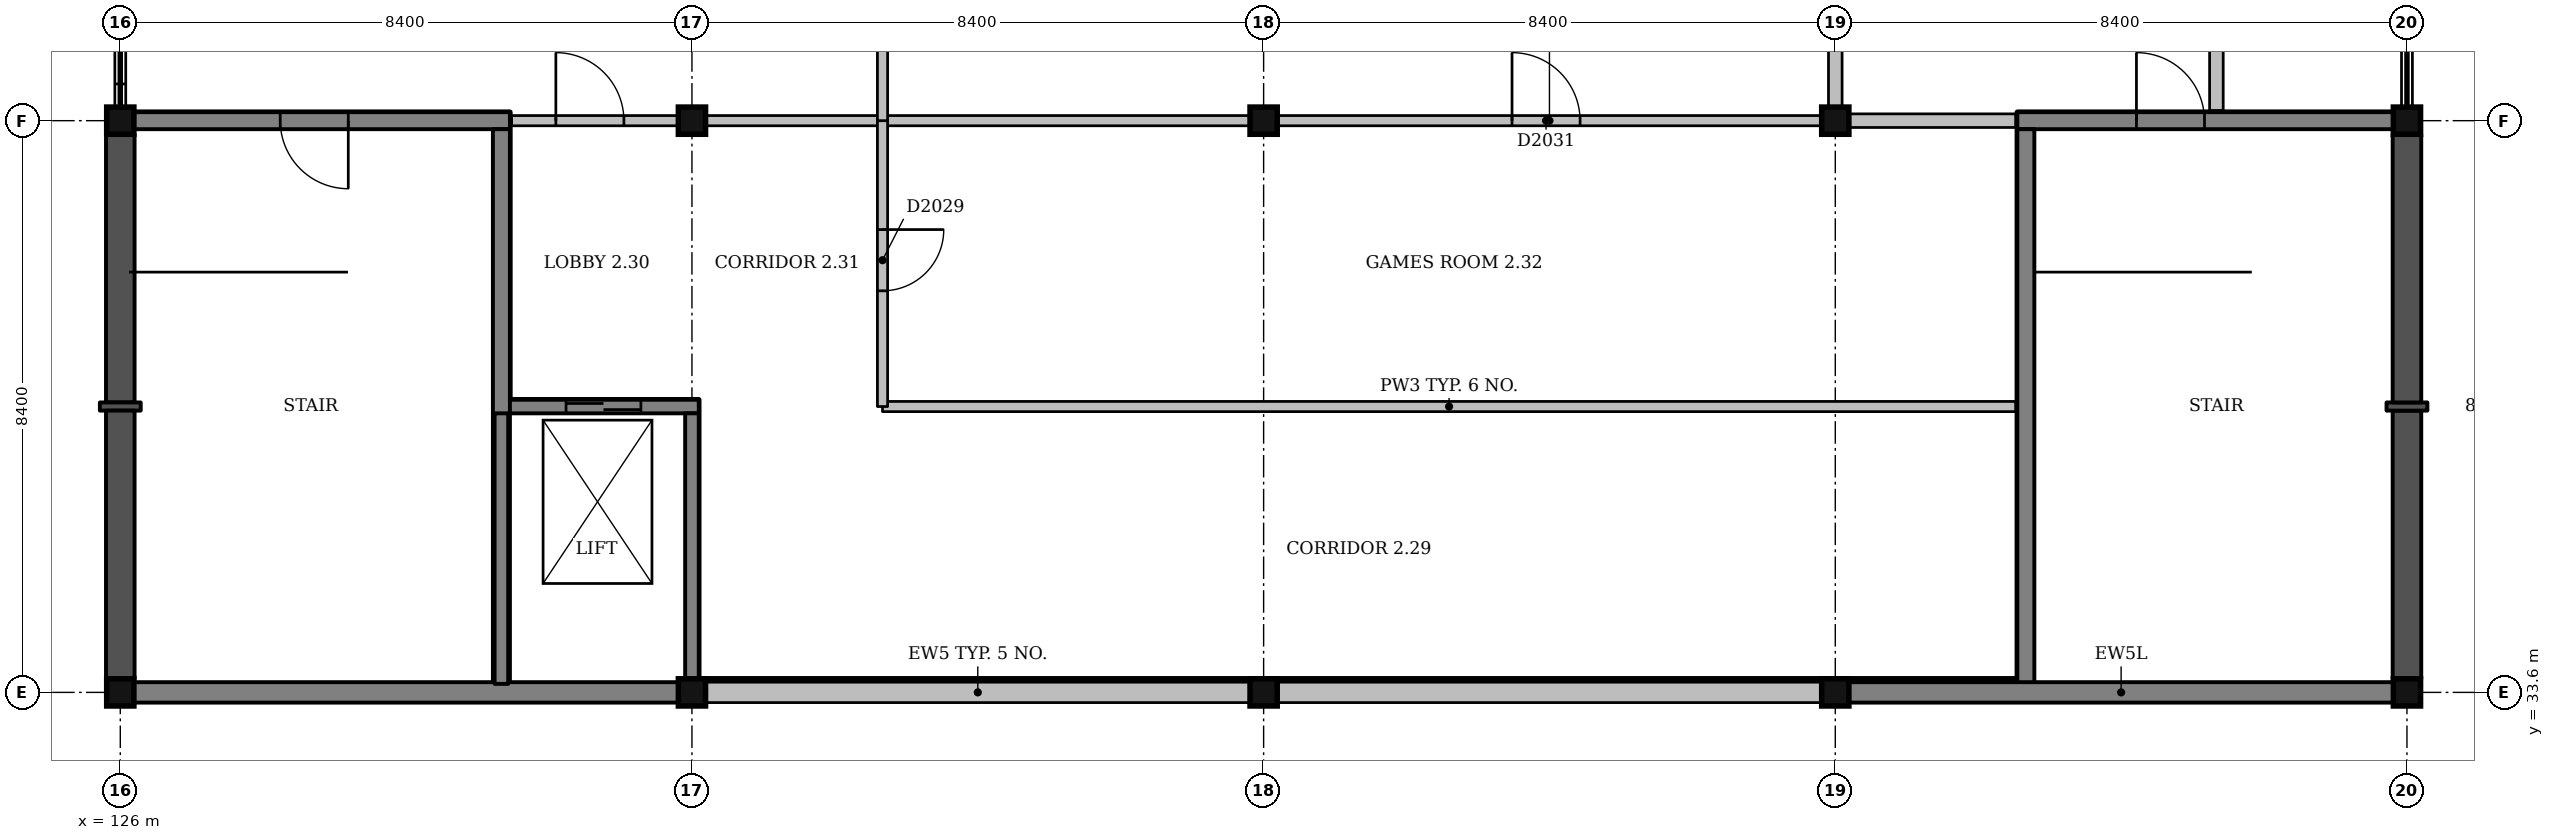
"""IFC4 building model, lengths in metres.
Left out: names, types, materials, properties, quantities, classifications, styles, units other than length and angle.
Written with IfcOpenShell. Run it as: python <this file> out.ifc"""

import sys

from ifc_helpers import new_model, si_unit, direction, frame, frame_2d, origin, origin_2d, place, context, subcontext, project, spatial, rectangle, extrude, element, fill, save


model = new_model("IFC4")
c1 = context("Model", 3, precision=1e-05, world=origin(), true_north=direction((0.0, 1.0)))
c2 = subcontext(c1, "Body", "Model", "MODEL_VIEW")
j1 = project(units=[si_unit("LENGTHUNIT", "METRE"), si_unit("PLANEANGLEUNIT", "RADIAN")], contexts=[c1])
p1 = place(None, origin())
s1 = spatial("IfcSite", under=j1, at=p1, CompositionType="ELEMENT")
p2 = place(p1, origin())
s2 = spatial("IfcBuilding", under=s1, at=p2, CompositionType="ELEMENT")
p3 = place(p2, frame((0.0, 0.0, 9.0)))
s3 = spatial("IfcBuildingStorey", under=s2, at=p3, CompositionType="ELEMENT", Elevation=9.0)
for number, where, z_axis, x_axis in (
    (1, (126.0, 33.6, 0.0), (0.0, 0.0, 1.0), (1.0, 0.0, 0.0)),
    (2, (126.0, 42.0, 0.0), (0.0, 0.0, 1.0), (1.0, 0.0, 0.0)),
    (3, (134.4, 33.6, 0.0), (0.0, 0.0, 1.0), (1.0, 0.0, 0.0)),
    (4, (134.4, 42.0, 0.0), (0.0, 0.0, 1.0), (1.0, 0.0, 0.0)),
    (5, (142.8, 33.6, 0.0), (0.0, 0.0, 1.0), (1.0, 0.0, 0.0)),
    (6, (142.8, 42.0, 0.0), (0.0, 0.0, 1.0), (1.0, 0.0, 0.0)),
    (7, (151.2, 33.6, 0.0), (0.0, 0.0, 1.0), (1.0, 0.0, 0.0)),
    (8, (151.2, 42.0, 0.0), (0.0, 0.0, 1.0), (1.0, 0.0, 0.0)),
    (9, (159.6, 33.6, 0.0), (0.0, 0.0, 1.0), (1.0, 0.0, 0.0)),
    (10, (159.6, 42.0, 0.0), (0.0, 0.0, 1.0), (1.0, 0.0, 0.0)),
):
    element("IfcColumn", number, at=place(p3, frame(where, z_axis=z_axis, x_axis=x_axis)), inside=s3, PredefinedType="COLUMN", context=c2, shape_type="SweptSolid", body=[
        extrude(rectangle(XDim=0.4, YDim=0.4, at=origin_2d()), origin(), (0.0, 0.0, 1.0), 4.5),
    ])
p4 = place(p3, frame((131.5, 37.8, 0.0), z_axis=(0.0, 0.0, 1.0), x_axis=(1.0, 0.0, 0.0)))
e11 = element("IfcWall", 11, at=p4, inside=s3, PredefinedType="SHEAR", context=c2, shape_type="SweptSolid", body=[
    extrude(rectangle(XDim=3.0, YDim=0.2, at=frame_2d((1.5, 0.0))), origin(), (0.0, 0.0, 1.0), 4.5),
])
p5 = place(p4, frame((1.05, 0.0, 0.0)))
e12 = element("IfcOpeningElement", 12, at=p5, cuts=e11, PredefinedType="OPENING", context=c2, shape_type="SweptSolid", body=[
    extrude(rectangle(XDim=1.1, YDim=2.1, at=frame_2d((0.55, 1.05))), frame((0.0, 0.11, 0.0), z_axis=(0.0, -1.0, 0.0), x_axis=(1.0, 0.0, 0.0)), (0.0, 0.0, 1.0), 0.22),
])
p6 = place(p3, frame((134.4, 33.8, 0.0), z_axis=(0.0, 0.0, 1.0), x_axis=(0.0, 1.0, 0.0)))
e13 = element("IfcWall", 13, at=p6, inside=s3, PredefinedType="SHEAR", context=c2, shape_type="SweptSolid", body=[
    extrude(rectangle(XDim=3.9, YDim=0.2, at=frame_2d((1.95, 0.0))), origin(), (0.0, 0.0, 1.0), 4.5),
])
p7 = place(p3, frame((126.2, 42.0, 0.0), z_axis=(0.0, 0.0, 1.0), x_axis=(1.0, 0.0, 0.0)))
e14 = element("IfcWall", 14, at=p7, inside=s3, PredefinedType="SHEAR", context=c2, shape_type="SweptSolid", body=[
    extrude(rectangle(XDim=5.525, YDim=0.25, at=frame_2d((2.763, 0.0))), origin(), (0.0, 0.0, 1.0), 4.2),
])
p8 = place(p7, frame((2.15, 0.0, 0.0)))
e15 = element("IfcOpeningElement", 15, at=p8, cuts=e14, PredefinedType="OPENING", context=c2, shape_type="SweptSolid", body=[
    extrude(rectangle(XDim=1.0, YDim=2.1, at=frame_2d((0.5, 1.05))), frame((0.0, 0.135, 0.0), z_axis=(0.0, -1.0, 0.0), x_axis=(1.0, 0.0, 0.0)), (0.0, 0.0, 1.0), 0.27),
])
p9 = place(p3, frame((131.6, 33.725, 0.0), z_axis=(0.0, 0.0, 1.0), x_axis=(0.0, 1.0, 0.0)))
e16 = element("IfcWall", 16, at=p9, inside=s3, PredefinedType="SHEAR", context=c2, shape_type="SweptSolid", body=[
    extrude(rectangle(XDim=8.15, YDim=0.25, at=frame_2d((4.075, 0.0))), origin(), (0.0, 0.0, 1.0), 4.2),
])
p10 = place(p3, frame((153.875, 42.0, 0.0), z_axis=(0.0, 0.0, 1.0), x_axis=(1.0, 0.0, 0.0)))
e17 = element("IfcWall", 17, at=p10, inside=s3, PredefinedType="SHEAR", context=c2, shape_type="SweptSolid", body=[
    extrude(rectangle(XDim=5.525, YDim=0.25, at=frame_2d((2.762, 0.0))), origin(), (0.0, 0.0, 1.0), 4.2),
])
p11 = place(p10, frame((1.75, 0.0, 0.0)))
e18 = element("IfcOpeningElement", 18, at=p11, cuts=e17, PredefinedType="OPENING", context=c2, shape_type="SweptSolid", body=[
    extrude(rectangle(XDim=1.0, YDim=2.1, at=frame_2d((0.5, 1.05))), frame((0.0, 0.135, 0.0), z_axis=(0.0, -1.0, 0.0), x_axis=(1.0, 0.0, 0.0)), (0.0, 0.0, 1.0), 0.27),
])
p12 = place(p3, frame((154.0, 33.725, 0.0), z_axis=(0.0, 0.0, 1.0), x_axis=(0.0, 1.0, 0.0)))
e19 = element("IfcWall", 19, at=p12, inside=s3, PredefinedType="SHEAR", context=c2, shape_type="SweptSolid", body=[
    extrude(rectangle(XDim=8.15, YDim=0.25, at=frame_2d((4.075, 0.0))), origin(), (0.0, 0.0, 1.0), 4.2),
])
p13 = place(p3, frame((159.6, 33.8, 0.0), z_axis=(0.0, 0.0, 1.0), x_axis=(0.0, 1.0, 0.0)))
e20 = element("IfcWall", 20, at=p13, inside=s3, PredefinedType="SOLIDWALL", context=c2, shape_type="SweptSolid", body=[
    extrude(rectangle(XDim=3.94, YDim=0.42, at=frame_2d((1.97, 0.0))), origin(), (0.0, 0.0, 1.0), 4.2),
])
p14 = place(p3, frame((159.6, 37.74, 0.0), z_axis=(0.0, 0.0, 1.0), x_axis=(0.0, 1.0, 0.0)))
e21 = element("IfcWall", 21, at=p14, inside=s3, PredefinedType="SOLIDWALL", context=c2, shape_type="SweptSolid", body=[
    extrude(rectangle(XDim=0.12, YDim=0.6, at=frame_2d((0.06, 0.0))), origin(), (0.0, 0.0, 1.0), 4.2),
])
for number, where, z_axis, x_axis in (
    (22, (159.6, 37.86, 0.0), (0.0, 0.0, 1.0), (0.0, 1.0, 0.0)),
    (23, (126.0, 41.8, 0.0), (0.0, 0.0, 1.0), (0.0, -1.0, 0.0)),
):
    element("IfcWall", number, at=place(p3, frame(where, z_axis=z_axis, x_axis=x_axis)), inside=s3, PredefinedType="SOLIDWALL", context=c2, shape_type="SweptSolid", body=[
        extrude(rectangle(XDim=3.94, YDim=0.42, at=frame_2d((1.97, 0.0))), origin(), (0.0, 0.0, 1.0), 4.2),
    ])
p15 = place(p3, frame((126.0, 37.86, 0.0), z_axis=(0.0, 0.0, 1.0), x_axis=(0.0, -1.0, 0.0)))
e24 = element("IfcWall", 24, at=p15, inside=s3, PredefinedType="SOLIDWALL", context=c2, shape_type="SweptSolid", body=[
    extrude(rectangle(XDim=0.12, YDim=0.6, at=frame_2d((0.06, 0.0))), origin(), (0.0, 0.0, 1.0), 4.2),
])
p16 = place(p3, frame((126.0, 37.74, 0.0), z_axis=(0.0, 0.0, 1.0), x_axis=(0.0, -1.0, 0.0)))
e25 = element("IfcWall", 25, at=p16, inside=s3, PredefinedType="SOLIDWALL", context=c2, shape_type="SweptSolid", body=[
    extrude(rectangle(XDim=3.94, YDim=0.42, at=frame_2d((1.97, 0.0))), origin(), (0.0, 0.0, 1.0), 4.2),
])
p17 = place(p3, frame((126.2, 33.6, 0.0), z_axis=(0.0, 0.0, 1.0), x_axis=(1.0, 0.0, 0.0)))
e26 = element("IfcWall", 26, at=p17, inside=s3, PredefinedType="SOLIDWALL", context=c2, shape_type="SweptSolid", body=[
    extrude(rectangle(XDim=8.0, YDim=0.3, at=frame_2d((4.0, 0.0))), origin(), (0.0, 0.0, 1.0), 4.2),
])
for number, where, z_axis, x_axis in (
    (27, (134.6, 33.6, 0.0), (0.0, 0.0, 1.0), (1.0, 0.0, 0.0)),
    (28, (143.0, 33.6, 0.0), (0.0, 0.0, 1.0), (1.0, 0.0, 0.0)),
    (29, (151.4, 33.6, 0.0), (0.0, 0.0, 1.0), (1.0, 0.0, 0.0)),
):
    element("IfcWall", number, at=place(p3, frame(where, z_axis=z_axis, x_axis=x_axis)), inside=s3, PredefinedType="SOLIDWALL", context=c2, shape_type="SweptSolid", body=[
        extrude(rectangle(XDim=8.0, YDim=0.3, at=frame_2d((4.0, 0.0))), origin(), (0.0, 0.0, 1.0), 3.9),
    ])
p18 = place(p3, frame((137.2, 37.8, 0.0), z_axis=(0.0, 0.0, 1.0), x_axis=(1.0, 0.0, 0.0)))
e30 = element("IfcWall", 30, at=p18, inside=s3, PredefinedType="PARTITIONING", context=c2, shape_type="SweptSolid", body=[
    extrude(rectangle(XDim=16.65, YDim=0.15, at=frame_2d((8.325, 0.0))), origin(), (0.0, 0.0, 1.0), 3.6),
])
p19 = place(p3, frame((134.6, 42.0, 0.0), z_axis=(0.0, 0.0, 1.0), x_axis=(1.0, 0.0, 0.0)))
e31 = element("IfcWall", 31, at=p19, inside=s3, PredefinedType="PARTITIONING", context=c2, shape_type="SweptSolid", body=[
    extrude(rectangle(XDim=2.6, YDim=0.15, at=frame_2d((1.3, 0.0))), origin(), (0.0, 0.0, 1.0), 3.6),
])
p20 = place(p3, frame((131.75, 42.0, 0.0), z_axis=(0.0, 0.0, 1.0), x_axis=(1.0, 0.0, 0.0)))
e32 = element("IfcWall", 32, at=p20, inside=s3, PredefinedType="PARTITIONING", context=c2, shape_type="SweptSolid", body=[
    extrude(rectangle(XDim=2.45, YDim=0.15, at=frame_2d((1.225, 0.0))), origin(), (0.0, 0.0, 1.0), 3.6),
])
p21 = place(p20, frame((0.65, 0.0, 0.0)))
e33 = element("IfcOpeningElement", 33, at=p21, cuts=e32, PredefinedType="OPENING", context=c2, shape_type="SweptSolid", body=[
    extrude(rectangle(XDim=1.0, YDim=2.1, at=frame_2d((0.5, 1.05))), frame((0.0, 0.085, 0.0), z_axis=(0.0, -1.0, 0.0), x_axis=(1.0, 0.0, 0.0)), (0.0, 0.0, 1.0), 0.17),
])
p22 = place(p3, frame((151.4, 42.0, 0.0), z_axis=(0.0, 0.0, 1.0), x_axis=(1.0, 0.0, 0.0)))
e34 = element("IfcWall", 34, at=p22, inside=s3, PredefinedType="PARTITIONING", context=c2, shape_type="SweptSolid", body=[
    extrude(rectangle(XDim=2.45, YDim=0.2, at=frame_2d((1.225, 0.0))), origin(), (0.0, 0.0, 1.0), 3.6),
])
p23 = place(p3, frame((137.2, 42.0, 0.0), z_axis=(0.0, 0.0, 1.0), x_axis=(1.0, 0.0, 0.0)))
e35 = element("IfcWall", 35, at=p23, inside=s3, PredefinedType="PARTITIONING", context=c2, shape_type="SweptSolid", body=[
    extrude(rectangle(XDim=5.4, YDim=0.15, at=frame_2d((2.7, 0.0))), origin(), (0.0, 0.0, 1.0), 3.6),
])
p24 = place(p3, frame((143.0, 42.0, 0.0), z_axis=(0.0, 0.0, 1.0), x_axis=(1.0, 0.0, 0.0)))
e36 = element("IfcWall", 36, at=p24, inside=s3, PredefinedType="PARTITIONING", context=c2, shape_type="SweptSolid", body=[
    extrude(rectangle(XDim=8.0, YDim=0.15, at=frame_2d((4.0, 0.0))), origin(), (0.0, 0.0, 1.0), 3.6),
])
p25 = place(p24, frame((3.45, 0.0, 0.0)))
e37 = element("IfcOpeningElement", 37, at=p25, cuts=e36, PredefinedType="OPENING", context=c2, shape_type="SweptSolid", body=[
    extrude(rectangle(XDim=1.0, YDim=2.1, at=frame_2d((0.5, 1.05))), frame((0.0, 0.085, 0.0), z_axis=(0.0, -1.0, 0.0), x_axis=(1.0, 0.0, 0.0)), (0.0, 0.0, 1.0), 0.17),
])
p26 = place(p3, frame((137.2, 37.8, 0.0), z_axis=(0.0, 0.0, 1.0), x_axis=(0.0, 1.0, 0.0)))
e38 = element("IfcWall", 38, at=p26, inside=s3, PredefinedType="PARTITIONING", context=c2, shape_type="SweptSolid", body=[
    extrude(rectangle(XDim=4.2, YDim=0.15, at=frame_2d((2.1, 0.0))), origin(), (0.0, 0.0, 1.0), 3.6),
])
p27 = place(p26, frame((1.7, 0.0, 0.0)))
e39 = element("IfcOpeningElement", 39, at=p27, cuts=e38, PredefinedType="OPENING", context=c2, shape_type="SweptSolid", body=[
    extrude(rectangle(XDim=0.9, YDim=2.1, at=frame_2d((0.45, 1.05))), frame((0.0, 0.085, 0.0), z_axis=(0.0, -1.0, 0.0), x_axis=(1.0, 0.0, 0.0)), (0.0, 0.0, 1.0), 0.17),
])
p28 = place(p3, frame((137.2, 42.0, 0.0), z_axis=(0.0, 0.0, 1.0), x_axis=(0.0, 1.0, 0.0)))
e40 = element("IfcWall", 40, at=p28, inside=s3, PredefinedType="PARTITIONING", context=c2, shape_type="SweptSolid", body=[
    extrude(rectangle(XDim=8.19, YDim=0.15, at=frame_2d((4.095, 0.0))), origin(), (0.0, 0.0, 1.0), 3.6),
])
p29 = place(p3, frame((151.2, 42.2, 0.0), z_axis=(0.0, 0.0, 1.0), x_axis=(0.0, 1.0, 0.0)))
e41 = element("IfcWall", 41, at=p29, inside=s3, PredefinedType="PARTITIONING", context=c2, shape_type="SweptSolid", body=[
    extrude(rectangle(XDim=8.0, YDim=0.2, at=frame_2d((4.0, 0.0))), origin(), (0.0, 0.0, 1.0), 3.6),
])
p30 = place(p29, frame((3.45, 0.0, 0.0)))
e42 = element("IfcOpeningElement", 42, at=p30, cuts=e41, PredefinedType="OPENING", context=c2, shape_type="SweptSolid", body=[
    extrude(rectangle(XDim=1.0, YDim=2.1, at=frame_2d((0.5, 1.05))), frame((0.0, 0.11, 0.0), z_axis=(0.0, -1.0, 0.0), x_axis=(1.0, 0.0, 0.0)), (0.0, 0.0, 1.0), 0.22),
])
p31 = place(p3, frame((156.8, 42.15, 0.0), z_axis=(0.0, 0.0, 1.0), x_axis=(0.0, 1.0, 0.0)))
e43 = element("IfcWall", 43, at=p31, inside=s3, PredefinedType="PARTITIONING", context=c2, shape_type="SweptSolid", body=[
    extrude(rectangle(XDim=8.04, YDim=0.2, at=frame_2d((4.02, 0.0))), origin(), (0.0, 0.0, 1.0), 4.15),
])
p32 = place(p31, frame((3.45, 0.0, 0.0)))
e44 = element("IfcOpeningElement", 44, at=p32, cuts=e43, PredefinedType="OPENING", context=c2, shape_type="SweptSolid", body=[
    extrude(rectangle(XDim=0.9, YDim=2.1, at=frame_2d((0.45, 1.05))), frame((0.0, 0.11, 0.0), z_axis=(0.0, -1.0, 0.0), x_axis=(1.0, 0.0, 0.0)), (0.0, 0.0, 1.0), 0.22),
])
p33 = place(p3, frame((131.6, 33.725, 4.2), z_axis=(0.0, 0.0, 1.0), x_axis=(0.0, 1.0, 0.0)))
e45 = element("IfcWall", 45, at=p33, inside=s3, PredefinedType="SHEAR", context=c2, shape_type="SweptSolid", body=[
    extrude(rectangle(XDim=3.975, YDim=0.2, at=frame_2d((1.987, 0.0))), origin(), (0.0, 0.0, 1.0), 0.3),
])
p34 = place(p3, frame((0.0, 0.0, 4.2)))
p35 = place(p34, frame((141.3, 40.5, 0.0)))
p36 = place(p35, frame((0.0, 0.0, 0.25)))
e46 = element("IfcWindow", 46, at=p36, inside=s3, PartitioningType="SINGLE_PANEL", PredefinedType="SKYLIGHT", context=c2, shape_type="SweptSolid", body=[
    extrude(rectangle(XDim=0.9, YDim=1.2, at=origin_2d()), origin(), (0.0, 0.0, 1.0), 0.05),
])
p37 = place(p27, origin())
e47 = element("IfcDoor", 47, at=p37, inside=s3, OperationType="SINGLE_SWING_RIGHT", PredefinedType="DOOR", context=c2, shape_type="SweptSolid", body=[
    extrude(rectangle(XDim=0.9, YDim=2.1, at=frame_2d((0.45, 1.05))), frame((0.0, 0.025, 0.0), z_axis=(0.0, -1.0, 0.0), x_axis=(1.0, 0.0, 0.0)), (0.0, 0.0, 1.0), 0.05),
])
fill(e39, e47)
p38 = place(p21, origin())
e48 = element("IfcDoor", 48, at=p38, inside=s3, OperationType="SINGLE_SWING_LEFT", PredefinedType="DOOR", context=c2, shape_type="SweptSolid", body=[
    extrude(rectangle(XDim=1.0, YDim=2.1, at=frame_2d((0.5, 1.05))), frame((0.0, 0.025, 0.0), z_axis=(0.0, -1.0, 0.0), x_axis=(1.0, 0.0, 0.0)), (0.0, 0.0, 1.0), 0.05),
])
fill(e33, e48)
p39 = place(p25, origin())
e49 = element("IfcDoor", 49, at=p39, inside=s3, OperationType="SINGLE_SWING_LEFT", PredefinedType="DOOR", context=c2, shape_type="SweptSolid", body=[
    extrude(rectangle(XDim=1.0, YDim=2.1, at=frame_2d((0.5, 1.05))), frame((0.0, 0.025, 0.0), z_axis=(0.0, -1.0, 0.0), x_axis=(1.0, 0.0, 0.0)), (0.0, 0.0, 1.0), 0.05),
])
fill(e37, e49)
p40 = place(p8, origin())
e50 = element("IfcDoor", 50, at=p40, inside=s3, OperationType="SINGLE_SWING_RIGHT", PredefinedType="DOOR", context=c2, shape_type="SweptSolid", body=[
    extrude(rectangle(XDim=1.0, YDim=2.1, at=frame_2d((0.5, 1.05))), frame((0.0, 0.025, 0.0), z_axis=(0.0, -1.0, 0.0), x_axis=(1.0, 0.0, 0.0)), (0.0, 0.0, 1.0), 0.05),
])
fill(e15, e50)
p41 = place(p11, origin())
e51 = element("IfcDoor", 51, at=p41, inside=s3, OperationType="SINGLE_SWING_LEFT", PredefinedType="DOOR", context=c2, shape_type="SweptSolid", body=[
    extrude(rectangle(XDim=1.0, YDim=2.1, at=frame_2d((0.5, 1.05))), frame((0.0, 0.025, 0.0), z_axis=(0.0, -1.0, 0.0), x_axis=(1.0, 0.0, 0.0)), (0.0, 0.0, 1.0), 0.05),
])
fill(e18, e51)
p42 = place(p5, origin())
e52 = element("IfcDoor", 52, at=p42, inside=s3, OperationType="SLIDING_TO_RIGHT", PredefinedType="DOOR", context=c2, shape_type="SweptSolid", body=[
    extrude(rectangle(XDim=1.1, YDim=2.1, at=frame_2d((0.55, 1.05))), frame((0.0, 0.025, 0.0), z_axis=(0.0, -1.0, 0.0), x_axis=(1.0, 0.0, 0.0)), (0.0, 0.0, 1.0), 0.05),
])
fill(e12, e52)
save(model, sys.argv[1])
